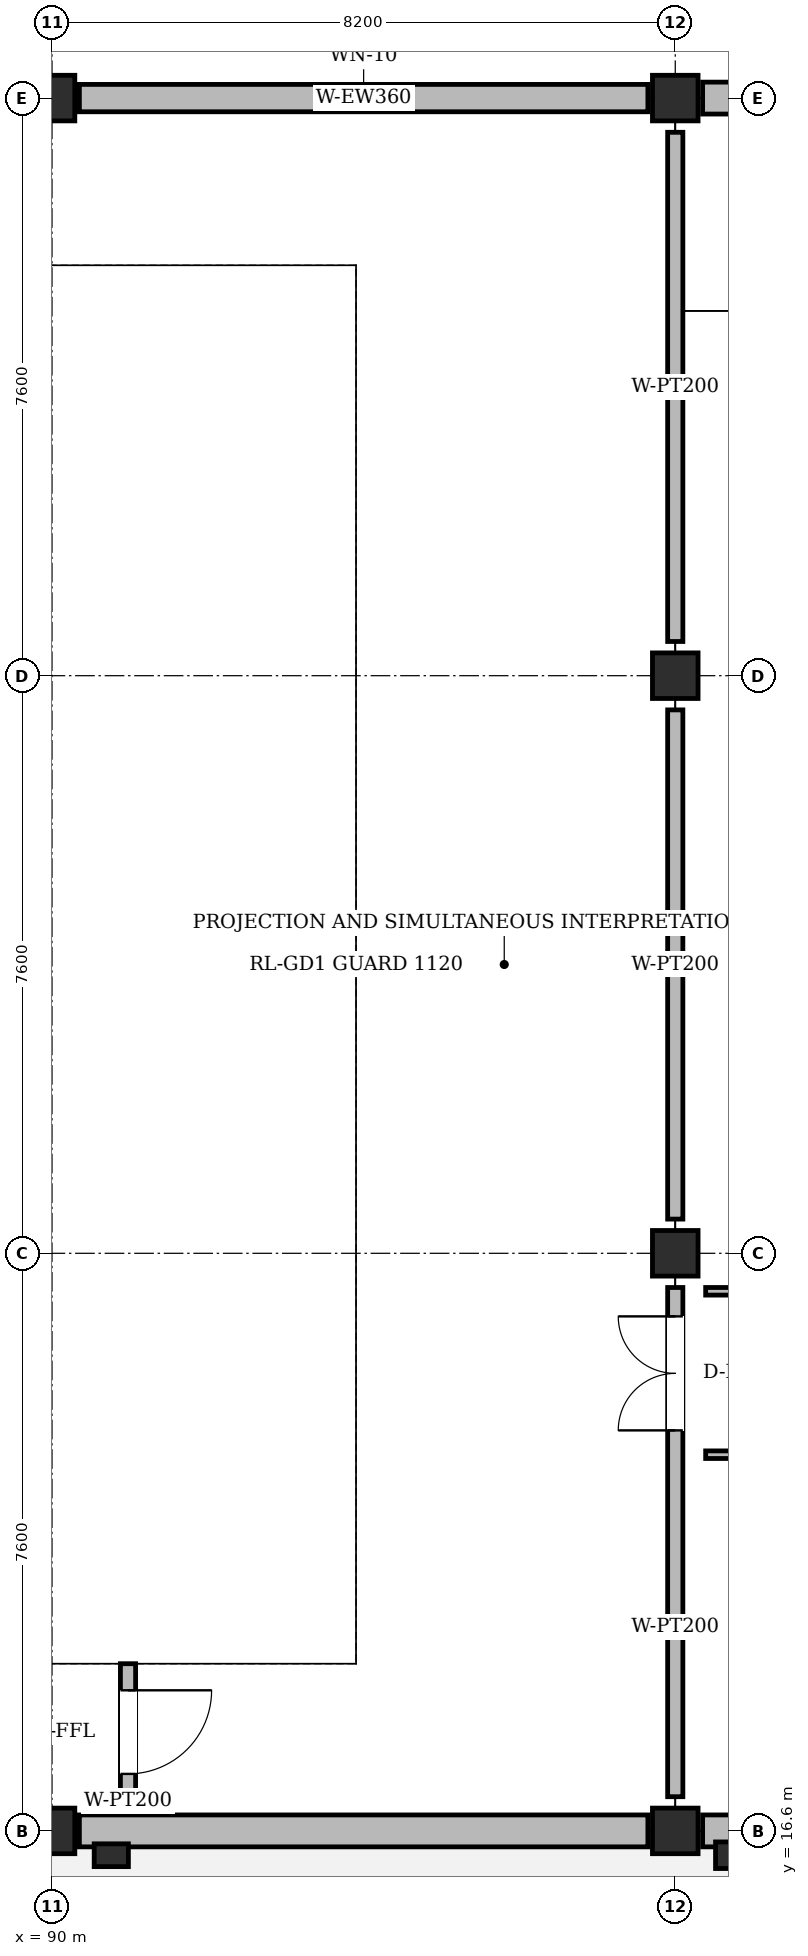
"""IFC4 building model, lengths in metres.
Left out: names, types, materials, properties, quantities, classifications, styles, units other than length and angle.
Written with IfcOpenShell. Run it as: python <this file> out.ifc"""

import sys

from ifc_helpers import new_model, si_unit, direction, frame, frame_2d, origin, origin_2d, place, context, subcontext, project, spatial, rectangle, extrude, element, fill, save


model = new_model("IFC4")
c1 = context("Model", 3, precision=1e-05, world=origin(), true_north=direction((0.0, 1.0)))
c2 = subcontext(c1, "Body", "Model", "MODEL_VIEW")
j1 = project(units=[si_unit("LENGTHUNIT", "METRE"), si_unit("PLANEANGLEUNIT", "RADIAN")], contexts=[c1])
p1 = place(None, origin())
s1 = spatial("IfcSite", under=j1, at=p1, CompositionType="ELEMENT")
p2 = place(p1, origin())
s2 = spatial("IfcBuilding", under=s1, at=p2, CompositionType="ELEMENT")
p3 = place(p2, frame((0.0, 0.0, 5.4)))
s3 = spatial("IfcBuildingStorey", under=s2, at=p3, CompositionType="ELEMENT", Elevation=5.4)
for number, where, z_axis, x_axis in (
    (1, (90.0, 16.6, 0.0), (0.0, 0.0, 1.0), (1.0, 0.0, 0.0)),
    (2, (90.0, 39.4, 0.0), (0.0, 0.0, 1.0), (1.0, 0.0, 0.0)),
):
    element("IfcColumn", number, at=place(p3, frame(where, z_axis=z_axis, x_axis=x_axis)), inside=s3, PredefinedType="COLUMN", context=c2, shape_type="SweptSolid", body=[
        extrude(rectangle(XDim=0.6, YDim=0.6, at=origin_2d()), origin(), (0.0, 0.0, 1.0), 4.8),
    ])
for number, where, z_axis, x_axis in (
    (3, (98.2, 16.6, 0.0), (0.0, 0.0, 1.0), (1.0, 0.0, 0.0)),
    (4, (98.2, 24.2, 0.0), (0.0, 0.0, 1.0), (1.0, 0.0, 0.0)),
    (5, (98.2, 31.8, 0.0), (0.0, 0.0, 1.0), (1.0, 0.0, 0.0)),
    (6, (98.2, 39.4, 0.0), (0.0, 0.0, 1.0), (1.0, 0.0, 0.0)),
):
    element("IfcColumn", number, at=place(p3, frame(where, z_axis=z_axis, x_axis=x_axis)), inside=s3, PredefinedType="COLUMN", context=c2, shape_type="SweptSolid", body=[
        extrude(rectangle(XDim=0.6, YDim=0.6, at=origin_2d()), origin(), (0.0, 0.0, 1.0), 4.52),
    ])
p4 = place(p3, frame((90.78, 16.28, 0.0), z_axis=(0.0, 0.0, 1.0), x_axis=(1.0, 0.0, 0.0)))
e7 = element("IfcColumn", 7, at=p4, inside=s3, PredefinedType="PILASTER", context=c2, shape_type="SweptSolid", body=[
    extrude(rectangle(XDim=0.45, YDim=0.3, at=origin_2d()), origin(), (0.0, 0.0, 1.0), 4.42),
])
p5 = place(p3, frame((98.98, 16.28, 0.0), z_axis=(0.0, 0.0, 1.0), x_axis=(1.0, 0.0, 0.0)))
e8 = element("IfcColumn", 8, at=p5, inside=s3, PredefinedType="PILASTER", context=c2, shape_type="SweptSolid", body=[
    extrude(rectangle(XDim=0.5, YDim=0.35, at=origin_2d()), origin(), (0.0, 0.0, 1.0), 4.42),
])
p6 = place(p3, frame((90.36, 16.6, 0.0), z_axis=(0.0, 0.0, 1.0), x_axis=(1.0, 0.0, 0.0)))
e9 = element("IfcWall", 9, at=p6, inside=s3, PredefinedType="SOLIDWALL", context=c2, shape_type="SweptSolid", body=[
    extrude(rectangle(XDim=7.48, YDim=0.42, at=frame_2d((3.74, 0.0))), origin(), (0.0, 0.0, 1.0), 3.885),
])
p7 = place(p3, frame((97.84, 39.4, 0.0), z_axis=(0.0, 0.0, 1.0), x_axis=(-1.0, 0.0, 0.0)))
e10 = element("IfcWall", 10, at=p7, inside=s3, PredefinedType="SOLIDWALL", context=c2, shape_type="SweptSolid", body=[
    extrude(rectangle(XDim=7.48, YDim=0.36, at=frame_2d((3.74, 0.0))), origin(), (0.0, 0.0, 1.0), 3.885),
])
p8 = place(p7, frame((3.14, 0.0, 0.95)))
e11 = element("IfcOpeningElement", 11, at=p8, cuts=e10, PredefinedType="OPENING", context=c2, shape_type="SweptSolid", body=[
    extrude(rectangle(XDim=1.2, YDim=2.6, at=frame_2d((0.6, 1.3))), frame((0.0, 0.192, 0.0), z_axis=(0.0, -1.0, 0.0), x_axis=(1.0, 0.0, 0.0)), (0.0, 0.0, 1.0), 0.384),
])
p9 = place(p3, frame((98.56, 16.6, 0.0), z_axis=(0.0, 0.0, 1.0), x_axis=(1.0, 0.0, 0.0)))
e12 = element("IfcWall", 12, at=p9, inside=s3, PredefinedType="SOLIDWALL", context=c2, shape_type="SweptSolid", body=[
    extrude(rectangle(XDim=7.48, YDim=0.42, at=frame_2d((3.74, 0.0))), origin(), (0.0, 0.0, 1.0), 3.93),
])
p10 = place(p9, frame((2.99, 0.0, 0.95)))
e13 = element("IfcOpeningElement", 13, at=p10, cuts=e12, PredefinedType="OPENING", context=c2, shape_type="SweptSolid", body=[
    extrude(rectangle(XDim=1.5, YDim=2.1, at=frame_2d((0.75, 1.05))), frame((0.0, 0.222, 0.0), z_axis=(0.0, -1.0, 0.0), x_axis=(1.0, 0.0, 0.0)), (0.0, 0.0, 1.0), 0.444),
])
p11 = place(p3, frame((106.04, 39.4, 0.0), z_axis=(0.0, 0.0, 1.0), x_axis=(-1.0, 0.0, 0.0)))
e14 = element("IfcWall", 14, at=p11, inside=s3, PredefinedType="SOLIDWALL", context=c2, shape_type="SweptSolid", body=[
    extrude(rectangle(XDim=7.48, YDim=0.42, at=frame_2d((3.74, 0.0))), origin(), (0.0, 0.0, 1.0), 3.905),
])
p12 = place(p11, frame((2.715, 0.0, 0.95)))
e15 = element("IfcOpeningElement", 15, at=p12, cuts=e14, PredefinedType="OPENING", context=c2, shape_type="SweptSolid", body=[
    extrude(rectangle(XDim=2.05, YDim=1.25, at=frame_2d((1.025, 0.625))), frame((0.0, 0.222, 0.0), z_axis=(0.0, -1.0, 0.0), x_axis=(1.0, 0.0, 0.0)), (0.0, 0.0, 1.0), 0.444),
])
p13 = place(p3, frame((98.2, 17.05, 0.0), z_axis=(0.0, 0.0, 1.0), x_axis=(0.0, 1.0, 0.0)))
e16 = element("IfcWall", 16, at=p13, inside=s3, PredefinedType="PARTITIONING", context=c2, shape_type="SweptSolid", body=[
    extrude(rectangle(XDim=6.7, YDim=0.2, at=frame_2d((3.35, 0.0))), origin(), (0.0, 0.0, 1.0), 3.905),
])
p14 = place(p13, frame((4.82, 0.0, 0.0)))
e17 = element("IfcOpeningElement", 17, at=p14, cuts=e16, PredefinedType="OPENING", context=c2, shape_type="SweptSolid", body=[
    extrude(rectangle(XDim=1.5, YDim=2.2, at=frame_2d((0.75, 1.1))), frame((0.0, 0.112, 0.0), z_axis=(0.0, -1.0, 0.0), x_axis=(1.0, 0.0, 0.0)), (0.0, 0.0, 1.0), 0.224),
])
p15 = place(p3, frame((98.2, 24.65, 0.0), z_axis=(0.0, 0.0, 1.0), x_axis=(0.0, 1.0, 0.0)))
e18 = element("IfcWall", 18, at=p15, inside=s3, PredefinedType="PARTITIONING", context=c2, shape_type="SweptSolid", body=[
    extrude(rectangle(XDim=6.7, YDim=0.2, at=frame_2d((3.35, 0.0))), origin(), (0.0, 0.0, 1.0), 3.905),
])
p16 = place(p3, frame((98.2, 32.25, 0.0), z_axis=(0.0, 0.0, 1.0), x_axis=(0.0, 1.0, 0.0)))
e19 = element("IfcWall", 19, at=p16, inside=s3, PredefinedType="PARTITIONING", context=c2, shape_type="SweptSolid", body=[
    extrude(rectangle(XDim=6.7, YDim=0.2, at=frame_2d((3.35, 0.0))), origin(), (0.0, 0.0, 1.0), 3.905),
])
p17 = place(p3, frame((147.95, 21.55, 0.0), z_axis=(0.0, 0.0, 1.0), x_axis=(-1.0, 0.0, 0.0)))
e20 = element("IfcWall", 20, at=p17, inside=s3, PredefinedType="PARTITIONING", context=c2, shape_type="SweptSolid", body=[
    extrude(rectangle(XDim=49.35, YDim=0.1, at=frame_2d((24.675, 0.0))), origin(), (0.0, 0.0, 1.0), 3.945),
])
p18 = place(p17, frame((23.775, 0.0, 0.0)))
e21 = element("IfcOpeningElement", 21, at=p18, cuts=e20, PredefinedType="OPENING", context=c2, shape_type="SweptSolid", body=[
    extrude(rectangle(XDim=1.8, YDim=2.4, at=frame_2d((0.9, 1.2))), frame((0.0, 0.062, 0.0), z_axis=(0.0, -1.0, 0.0), x_axis=(1.0, 0.0, 0.0)), (0.0, 0.0, 1.0), 0.124),
])
p19 = place(p3, frame((98.6, 23.7, 0.0), z_axis=(0.0, 0.0, 1.0), x_axis=(1.0, 0.0, 0.0)))
e22 = element("IfcWall", 22, at=p19, inside=s3, PredefinedType="PARTITIONING", context=c2, shape_type="SweptSolid", body=[
    extrude(rectangle(XDim=40.9, YDim=0.1, at=frame_2d((20.45, 0.0))), origin(), (0.0, 0.0, 1.0), 3.305),
])
p20 = place(p19, frame((19.55, 0.0, 0.0)))
e23 = element("IfcOpeningElement", 23, at=p20, cuts=e22, PredefinedType="OPENING", context=c2, shape_type="SweptSolid", body=[
    extrude(rectangle(XDim=1.8, YDim=2.4, at=frame_2d((0.9, 1.2))), frame((0.0, 0.062, 0.0), z_axis=(0.0, -1.0, 0.0), x_axis=(1.0, 0.0, 0.0)), (0.0, 0.0, 1.0), 0.124),
])
p21 = place(p3, frame((91.0, 18.8, 0.0), z_axis=(0.0, 0.0, 1.0), x_axis=(0.0, -1.0, 0.0)))
e24 = element("IfcWall", 24, at=p21, inside=s3, PredefinedType="PARTITIONING", context=c2, shape_type="SweptSolid", body=[
    extrude(rectangle(XDim=1.8, YDim=0.2, at=frame_2d((0.9, 0.0))), origin(), (0.0, 0.0, 1.0), 4.405),
])
p22 = place(p21, frame((0.35, 0.0, 0.0)))
e25 = element("IfcOpeningElement", 25, at=p22, cuts=e24, PredefinedType="OPENING", context=c2, shape_type="SweptSolid", body=[
    extrude(rectangle(XDim=1.1, YDim=2.2, at=frame_2d((0.55, 1.1))), frame((0.0, 0.112, 0.0), z_axis=(0.0, -1.0, 0.0), x_axis=(1.0, 0.0, 0.0)), (0.0, 0.0, 1.0), 0.224),
])
p23 = place(p8, origin())
e26 = element("IfcWindow", 26, at=p23, inside=s3, PartitioningType="SINGLE_PANEL", PredefinedType="WINDOW", context=c2, shape_type="SweptSolid", body=[
    extrude(rectangle(XDim=1.2, YDim=2.6, at=frame_2d((0.6, 1.3))), frame((0.0, 0.03, 0.0), z_axis=(0.0, -1.0, 0.0), x_axis=(1.0, 0.0, 0.0)), (0.0, 0.0, 1.0), 0.06),
])
fill(e11, e26)
p24 = place(p14, origin())
e27 = element("IfcDoor", 27, at=p24, inside=s3, OperationType="DOUBLE_DOOR_SINGLE_SWING", PredefinedType="DOOR", context=c2, shape_type="SweptSolid", body=[
    extrude(rectangle(XDim=1.5, YDim=2.2, at=frame_2d((0.75, 1.1))), frame((0.0, 0.025, 0.0), z_axis=(0.0, -1.0, 0.0), x_axis=(1.0, 0.0, 0.0)), (0.0, 0.0, 1.0), 0.05),
])
fill(e17, e27)
p25 = place(p22, origin())
e28 = element("IfcDoor", 28, at=p25, inside=s3, OperationType="SINGLE_SWING_LEFT", PredefinedType="DOOR", context=c2, shape_type="SweptSolid", body=[
    extrude(rectangle(XDim=1.1, YDim=2.2, at=frame_2d((0.55, 1.1))), frame((0.0, 0.025, 0.0), z_axis=(0.0, -1.0, 0.0), x_axis=(1.0, 0.0, 0.0)), (0.0, 0.0, 1.0), 0.05),
])
fill(e25, e28)
save(model, sys.argv[1])
